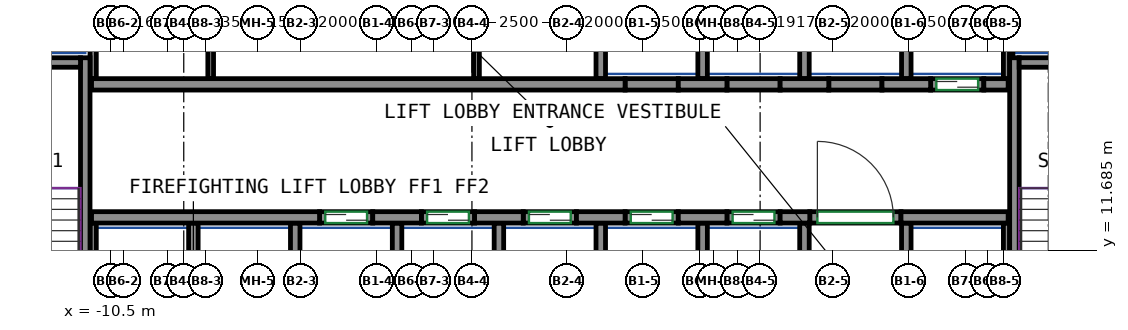
"""IFC4 building model, lengths in metres.
Left out: names, types, materials, properties, quantities, classifications, styles, units other than length and angle.
Written with IfcOpenShell. Run it as: python <this file> out.ifc"""

import sys

from ifc_helpers import new_model, si_unit, direction, frame, frame_2d, origin, place, context, subcontext, project, spatial, rectangle, extrude, source, transform, mapped, element, fill, save


model = new_model("IFC4")
c1 = context("Model", 3, precision=1e-05, world=origin(), true_north=direction((0.0, 1.0)))
c2 = subcontext(c1, "Body", "Model", "MODEL_VIEW")
j1 = project(units=[si_unit("LENGTHUNIT", "METRE"), si_unit("PLANEANGLEUNIT", "RADIAN")], contexts=[c1])
p1 = place(None, origin())
s1 = spatial("IfcSite", under=j1, at=p1, CompositionType="ELEMENT")
p2 = place(p1, origin())
s2 = spatial("IfcBuilding", under=s1, at=p2, CompositionType="ELEMENT")
p3 = place(p2, frame((0.0, 0.0, 154.1)))
s3 = spatial("IfcBuildingStorey", under=s2, at=p3, CompositionType="ELEMENT", Elevation=154.1)
m1 = source(origin(), c2, "Body", "SweptSolid", [
    extrude(rectangle(XDim=7.75, YDim=0.25, at=frame_2d((3.875, 0.0))), origin(), (0.0, 0.0, 1.0), 3.12),
])
p4 = place(p3, frame((-11.175, 9.0, 0.0), z_axis=(0.0, 0.0, 1.0), x_axis=(0.0, 1.0, 0.0)))
e1 = element("IfcWall", 1, at=p4, inside=s3, PredefinedType="SHEAR", context=c2, shape_type="MappedRepresentation", body=[
    mapped(m1, transform((0.0, 0.0, 0.0))),
])
m2 = source(origin(), c2, "Body", "SweptSolid", [
    extrude(rectangle(XDim=3.7, YDim=0.25, at=frame_2d((1.85, 0.0))), origin(), (0.0, 0.0, 1.0), 3.12),
])
p5 = place(p3, frame((-15.0, 16.625, 0.0), z_axis=(0.0, 0.0, 1.0), x_axis=(1.0, 0.0, 0.0)))
e2 = element("IfcWall", 2, at=p5, inside=s3, PredefinedType="SHEAR", context=c2, shape_type="MappedRepresentation", body=[
    mapped(m2, transform((0.0, 0.0, 0.0))),
])
p6 = place(p3, frame((13.275, 9.0, 0.0), z_axis=(0.0, 0.0, 1.0), x_axis=(0.0, 1.0, 0.0)))
e3 = element("IfcWall", 3, at=p6, inside=s3, PredefinedType="SHEAR", context=c2, shape_type="MappedRepresentation", body=[
    mapped(m1, transform((0.0, 0.0, 0.0))),
])
m3 = source(origin(), c2, "Body", "SweptSolid", [
    extrude(rectangle(XDim=3.7, YDim=0.25, at=frame_2d((1.85, 0.0))), origin(), (0.0, 0.0, 1.0), 3.12),
])
p7 = place(p3, frame((13.4, 16.625, 0.0), z_axis=(0.0, 0.0, 1.0), x_axis=(1.0, 0.0, 0.0)))
e4 = element("IfcWall", 4, at=p7, inside=s3, PredefinedType="SHEAR", context=c2, shape_type="MappedRepresentation", body=[
    mapped(m3, transform((0.0, 0.0, 0.0))),
])
m4 = source(origin(), c2, "Body", "SweptSolid", [
    extrude(rectangle(XDim=6.0, YDim=0.3, at=frame_2d((3.0, 0.0))), origin(), (0.0, 0.0, 1.0), 3.12),
])
p8 = place(p3, frame((-11.01, 12.55, 0.0), z_axis=(0.0, 0.0, 1.0), x_axis=(1.0, 0.0, 0.0)))
e5 = element("IfcWall", 5, at=p8, inside=s3, PredefinedType="SHEAR", context=c2, shape_type="MappedRepresentation", body=[
    mapped(m4, transform((0.0, 0.0, 0.0))),
])
m5 = source(origin(), c2, "Body", "SweptSolid", [
    extrude(rectangle(XDim=1.28, YDim=0.3, at=frame_2d((0.64, 0.0))), origin(), (0.0, 0.0, 1.0), 3.12),
])
for number, where, z_axis, x_axis in (
    (6, (-3.61, 12.55, 0.0), (0.0, 0.0, 1.0), (1.0, 0.0, 0.0)),
    (7, (-0.93, 12.55, 0.0), (0.0, 0.0, 1.0), (1.0, 0.0, 0.0)),
    (8, (1.75, 12.55, 0.0), (0.0, 0.0, 1.0), (1.0, 0.0, 0.0)),
    (9, (4.43, 12.55, 0.0), (0.0, 0.0, 1.0), (1.0, 0.0, 0.0)),
):
    element("IfcWall", number, at=place(p3, frame(where, z_axis=z_axis, x_axis=x_axis)), inside=s3, PredefinedType="SHEAR", context=c2, shape_type="MappedRepresentation", body=[
        mapped(m5, transform((0.0, 0.0, 0.0))),
    ])
m6 = source(origin(), c2, "Body", "SweptSolid", [
    extrude(rectangle(XDim=0.78, YDim=0.3, at=frame_2d((0.39, 0.0))), origin(), (0.0, 0.0, 1.0), 3.12),
])
p9 = place(p3, frame((7.11, 12.55, 0.0), z_axis=(0.0, 0.0, 1.0), x_axis=(1.0, 0.0, 0.0)))
e10 = element("IfcWall", 10, at=p9, inside=s3, PredefinedType="SHEAR", context=c2, shape_type="MappedRepresentation", body=[
    mapped(m6, transform((0.0, 0.0, 0.0))),
])
m7 = source(origin(), c2, "Body", "SweptSolid", [
    extrude(rectangle(XDim=2.82, YDim=0.3, at=frame_2d((1.41, 0.0))), origin(), (0.0, 0.0, 1.0), 3.12),
])
p10 = place(p3, frame((10.29, 12.55, 0.0), z_axis=(0.0, 0.0, 1.0), x_axis=(1.0, 0.0, 0.0)))
e11 = element("IfcWall", 11, at=p10, inside=s3, PredefinedType="SHEAR", context=c2, shape_type="MappedRepresentation", body=[
    mapped(m7, transform((0.0, 0.0, 0.0))),
])
m8 = source(origin(), c2, "Body", "SweptSolid", [
    extrude(rectangle(XDim=14.04, YDim=0.3, at=frame_2d((7.02, 0.0))), origin(), (0.0, 0.0, 1.0), 3.12),
])
p11 = place(p3, frame((-11.01, 16.05, 0.0), z_axis=(0.0, 0.0, 1.0), x_axis=(1.0, 0.0, 0.0)))
e12 = element("IfcWall", 12, at=p11, inside=s3, PredefinedType="SHEAR", context=c2, shape_type="MappedRepresentation", body=[
    mapped(m8, transform((0.0, 0.0, 0.0))),
])
p12 = place(p3, frame((4.43, 16.05, 0.0), z_axis=(0.0, 0.0, 1.0), x_axis=(1.0, 0.0, 0.0)))
e13 = element("IfcWall", 13, at=p12, inside=s3, PredefinedType="SHEAR", context=c2, shape_type="MappedRepresentation", body=[
    mapped(m5, transform((0.0, 0.0, 0.0))),
])
m9 = source(origin(), c2, "Body", "SweptSolid", [
    extrude(rectangle(XDim=1.28, YDim=0.3, at=frame_2d((0.64, 0.0))), origin(), (0.0, 0.0, 1.0), 3.12),
])
p13 = place(p3, frame((7.11, 16.05, 0.0), z_axis=(0.0, 0.0, 1.0), x_axis=(1.0, 0.0, 0.0)))
e14 = element("IfcWall", 14, at=p13, inside=s3, PredefinedType="SHEAR", context=c2, shape_type="MappedRepresentation", body=[
    mapped(m9, transform((0.0, 0.0, 0.0))),
])
p14 = place(p3, frame((9.79, 16.05, 0.0), z_axis=(0.0, 0.0, 1.0), x_axis=(1.0, 0.0, 0.0)))
e15 = element("IfcWall", 15, at=p14, inside=s3, PredefinedType="SHEAR", context=c2, shape_type="MappedRepresentation", body=[
    mapped(m5, transform((0.0, 0.0, 0.0))),
])
m10 = source(origin(), c2, "Body", "SweptSolid", [
    extrude(rectangle(XDim=0.64, YDim=0.3, at=frame_2d((0.32, 0.0))), origin(), (0.0, 0.0, 1.0), 3.12),
])
p15 = place(p3, frame((12.47, 16.05, 0.0), z_axis=(0.0, 0.0, 1.0), x_axis=(1.0, 0.0, 0.0)))
e16 = element("IfcWall", 16, at=p15, inside=s3, PredefinedType="SHEAR", context=c2, shape_type="MappedRepresentation", body=[
    mapped(m10, transform((0.0, 0.0, 0.0))),
])
m11 = source(origin(), c2, "Body", "SweptSolid", [
    extrude(rectangle(XDim=1.4, YDim=0.3, at=frame_2d((0.7, 0.0))), origin(), (0.0, 0.0, 1.0), 3.12),
])
p16 = place(p3, frame((-5.01, 12.55, 0.0), z_axis=(0.0, 0.0, 1.0), x_axis=(1.0, 0.0, 0.0)))
e17 = element("IfcWall", 17, at=p16, inside=s3, PredefinedType="PARTITIONING", context=c2, shape_type="MappedRepresentation", body=[
    mapped(m11, transform((0.0, 0.0, 0.0))),
])
p17 = place(p16, frame((0.15, 0.0, 0.0)))
e18 = element("IfcOpeningElement", 18, at=p17, cuts=e17, PredefinedType="OPENING", context=c2, shape_type="SweptSolid", body=[
    extrude(rectangle(XDim=1.1, YDim=2.1, at=frame_2d((0.55, 1.05))), frame((0.0, 0.16, 0.0), z_axis=(0.0, -1.0, 0.0), x_axis=(1.0, 0.0, 0.0)), (0.0, 0.0, 1.0), 0.32),
])
m12 = source(origin(), c2, "Body", "SweptSolid", [
    extrude(rectangle(XDim=1.4, YDim=0.3, at=frame_2d((0.7, 0.0))), origin(), (0.0, 0.0, 1.0), 3.12),
])
p18 = place(p3, frame((-2.33, 12.55, 0.0), z_axis=(0.0, 0.0, 1.0), x_axis=(1.0, 0.0, 0.0)))
e19 = element("IfcWall", 19, at=p18, inside=s3, PredefinedType="PARTITIONING", context=c2, shape_type="MappedRepresentation", body=[
    mapped(m12, transform((0.0, 0.0, 0.0))),
])
p19 = place(p18, frame((0.15, 0.0, 0.0)))
e20 = element("IfcOpeningElement", 20, at=p19, cuts=e19, PredefinedType="OPENING", context=c2, shape_type="SweptSolid", body=[
    extrude(rectangle(XDim=1.1, YDim=2.1, at=frame_2d((0.55, 1.05))), frame((0.0, 0.16, 0.0), z_axis=(0.0, -1.0, 0.0), x_axis=(1.0, 0.0, 0.0)), (0.0, 0.0, 1.0), 0.32),
])
p20 = place(p3, frame((0.35, 12.55, 0.0), z_axis=(0.0, 0.0, 1.0), x_axis=(1.0, 0.0, 0.0)))
e21 = element("IfcWall", 21, at=p20, inside=s3, PredefinedType="PARTITIONING", context=c2, shape_type="MappedRepresentation", body=[
    mapped(m11, transform((0.0, 0.0, 0.0))),
])
p21 = place(p20, frame((0.15, 0.0, 0.0)))
e22 = element("IfcOpeningElement", 22, at=p21, cuts=e21, PredefinedType="OPENING", context=c2, shape_type="SweptSolid", body=[
    extrude(rectangle(XDim=1.1, YDim=2.1, at=frame_2d((0.55, 1.05))), frame((0.0, 0.16, 0.0), z_axis=(0.0, -1.0, 0.0), x_axis=(1.0, 0.0, 0.0)), (0.0, 0.0, 1.0), 0.32),
])
p22 = place(p3, frame((3.03, 12.55, 0.0), z_axis=(0.0, 0.0, 1.0), x_axis=(1.0, 0.0, 0.0)))
e23 = element("IfcWall", 23, at=p22, inside=s3, PredefinedType="PARTITIONING", context=c2, shape_type="MappedRepresentation", body=[
    mapped(m11, transform((0.0, 0.0, 0.0))),
])
p23 = place(p22, frame((0.15, 0.0, 0.0)))
e24 = element("IfcOpeningElement", 24, at=p23, cuts=e23, PredefinedType="OPENING", context=c2, shape_type="SweptSolid", body=[
    extrude(rectangle(XDim=1.1, YDim=2.1, at=frame_2d((0.55, 1.05))), frame((0.0, 0.16, 0.0), z_axis=(0.0, -1.0, 0.0), x_axis=(1.0, 0.0, 0.0)), (0.0, 0.0, 1.0), 0.32),
])
p24 = place(p3, frame((5.71, 12.55, 0.0), z_axis=(0.0, 0.0, 1.0), x_axis=(1.0, 0.0, 0.0)))
e25 = element("IfcWall", 25, at=p24, inside=s3, PredefinedType="PARTITIONING", context=c2, shape_type="MappedRepresentation", body=[
    mapped(m12, transform((0.0, 0.0, 0.0))),
])
p25 = place(p24, frame((0.15, 0.0, 0.0)))
e26 = element("IfcOpeningElement", 26, at=p25, cuts=e25, PredefinedType="OPENING", context=c2, shape_type="SweptSolid", body=[
    extrude(rectangle(XDim=1.1, YDim=2.1, at=frame_2d((0.55, 1.05))), frame((0.0, 0.16, 0.0), z_axis=(0.0, -1.0, 0.0), x_axis=(1.0, 0.0, 0.0)), (0.0, 0.0, 1.0), 0.32),
])
p26 = place(p3, frame((11.07, 16.05, 0.0), z_axis=(0.0, 0.0, 1.0), x_axis=(1.0, 0.0, 0.0)))
e27 = element("IfcWall", 27, at=p26, inside=s3, PredefinedType="PARTITIONING", context=c2, shape_type="MappedRepresentation", body=[
    mapped(m11, transform((0.0, 0.0, 0.0))),
])
p27 = place(p26, frame((0.15, 0.0, 0.0)))
e28 = element("IfcOpeningElement", 28, at=p27, cuts=e27, PredefinedType="OPENING", context=c2, shape_type="SweptSolid", body=[
    extrude(rectangle(XDim=1.1, YDim=2.1, at=frame_2d((0.55, 1.05))), frame((0.0, 0.16, 0.0), z_axis=(0.0, -1.0, 0.0), x_axis=(1.0, 0.0, 0.0)), (0.0, 0.0, 1.0), 0.32),
])
m13 = source(origin(), c2, "Body", "SweptSolid", [
    extrude(rectangle(XDim=2.4, YDim=0.3, at=frame_2d((1.2, 0.0))), origin(), (0.0, 0.0, 1.0), 3.12),
])
p28 = place(p3, frame((7.89, 12.55, 0.0), z_axis=(0.0, 0.0, 1.0), x_axis=(1.0, 0.0, 0.0)))
e29 = element("IfcWall", 29, at=p28, inside=s3, PredefinedType="PARTITIONING", context=c2, shape_type="MappedRepresentation", body=[
    mapped(m13, transform((0.0, 0.0, 0.0))),
])
p29 = place(p28, frame((0.2, 0.0, 0.0)))
e30 = element("IfcOpeningElement", 30, at=p29, cuts=e29, PredefinedType="OPENING", context=c2, shape_type="SweptSolid", body=[
    extrude(rectangle(XDim=2.0, YDim=2.1, at=frame_2d((1.0, 1.05))), frame((0.0, 0.16, 0.0), z_axis=(0.0, -1.0, 0.0), x_axis=(1.0, 0.0, 0.0)), (0.0, 0.0, 1.0), 0.32),
])
p30 = place(p3, frame((3.03, 16.05, 0.0), z_axis=(0.0, 0.0, 1.0), x_axis=(1.0, 0.0, 0.0)))
e31 = element("IfcWall", 31, at=p30, inside=s3, PredefinedType="PARTITIONING", context=c2, shape_type="MappedRepresentation", body=[
    mapped(m11, transform((0.0, 0.0, 0.0))),
])
for number, where, z_axis, x_axis in (
    (32, (5.71, 16.05, 0.0), (0.0, 0.0, 1.0), (1.0, 0.0, 0.0)),
    (33, (8.39, 16.05, 0.0), (0.0, 0.0, 1.0), (1.0, 0.0, 0.0)),
):
    element("IfcWall", number, at=place(p3, frame(where, z_axis=z_axis, x_axis=x_axis)), inside=s3, PredefinedType="PARTITIONING", context=c2, shape_type="MappedRepresentation", body=[
        mapped(m12, transform((0.0, 0.0, 0.0))),
    ])
m14 = source(origin(), c2, "Body", "SweptSolid", [
    extrude(rectangle(XDim=3.275, YDim=0.165, at=frame_2d((1.638, 0.0))), origin(), (0.0, 0.0, 1.0), 3.12),
])
p31 = place(p3, frame((13.067, 16.2, 0.0), z_axis=(0.0, 0.0, 1.0), x_axis=(0.0, 1.0, 0.0)))
e34 = element("IfcWall", 34, at=p31, inside=s3, PredefinedType="PARTITIONING", context=c2, shape_type="MappedRepresentation", body=[
    mapped(m14, transform((0.0, 0.0, 0.0))),
])
m15 = source(origin(), c2, "Body", "SweptSolid", [
    extrude(rectangle(XDim=4.8, YDim=0.165, at=frame_2d((2.4, 0.0))), origin(), (0.0, 0.0, 1.0), 3.12),
])
p32 = place(p3, frame((-10.968, 16.2, 0.0), z_axis=(0.0, 0.0, 1.0), x_axis=(0.0, 1.0, 0.0)))
e35 = element("IfcWall", 35, at=p32, inside=s3, PredefinedType="PARTITIONING", context=c2, shape_type="MappedRepresentation", body=[
    mapped(m15, transform((0.0, 0.0, 0.0))),
])
m16 = source(origin(), c2, "Body", "SweptSolid", [
    extrude(rectangle(XDim=3.275, YDim=0.25, at=frame_2d((1.638, 0.0))), origin(), (0.0, 0.0, 1.0), 3.12),
])
p33 = place(p3, frame((10.43, 16.2, 0.0), z_axis=(0.0, 0.0, 1.0), x_axis=(0.0, 1.0, 0.0)))
e36 = element("IfcWall", 36, at=p33, inside=s3, PredefinedType="PARTITIONING", context=c2, shape_type="MappedRepresentation", body=[
    mapped(m16, transform((0.0, 0.0, 0.0))),
])
m17 = source(origin(), c2, "Body", "SweptSolid", [
    extrude(rectangle(XDim=2.725, YDim=0.085, at=frame_2d((1.363, 0.0))), origin(), (0.0, 0.0, 1.0), 3.12),
])
p34 = place(p3, frame((13.192, 16.75, 0.0), z_axis=(0.0, 0.0, 1.0), x_axis=(0.0, 1.0, 0.0)))
e37 = element("IfcWall", 37, at=p34, inside=s3, PredefinedType="PARTITIONING", context=c2, shape_type="MappedRepresentation", body=[
    mapped(m17, transform((0.0, 0.0, 0.0))),
])
for number, where, z_axis, x_axis in (
    (38, (2.39, 16.2, 0.0), (0.0, 0.0, 1.0), (0.0, 1.0, 0.0)),
    (39, (5.07, 16.2, 0.0), (0.0, 0.0, 1.0), (0.0, 1.0, 0.0)),
    (40, (7.75, 16.2, 0.0), (0.0, 0.0, 1.0), (0.0, 1.0, 0.0)),
):
    element("IfcWall", number, at=place(p3, frame(where, z_axis=z_axis, x_axis=x_axis)), inside=s3, PredefinedType="PARTITIONING", context=c2, shape_type="MappedRepresentation", body=[
        mapped(m16, transform((0.0, 0.0, 0.0))),
    ])
m18 = source(origin(), c2, "Body", "SweptSolid", [
    extrude(rectangle(XDim=3.4, YDim=0.25, at=frame_2d((1.7, 0.0))), origin(), (0.0, 0.0, 1.0), 3.12),
])
p35 = place(p3, frame((10.43, 9.0, 0.0), z_axis=(0.0, 0.0, 1.0), x_axis=(0.0, 1.0, 0.0)))
e41 = element("IfcWall", 41, at=p35, inside=s3, PredefinedType="PARTITIONING", context=c2, shape_type="MappedRepresentation", body=[
    mapped(m18, transform((0.0, 0.0, 0.0))),
])
m19 = source(origin(), c2, "Body", "SweptSolid", [
    extrude(rectangle(XDim=3.4, YDim=0.165, at=frame_2d((1.7, 0.0))), origin(), (0.0, 0.0, 1.0), 3.12),
])
p36 = place(p3, frame((13.067, 9.0, 0.0), z_axis=(0.0, 0.0, 1.0), x_axis=(0.0, 1.0, 0.0)))
e42 = element("IfcWall", 42, at=p36, inside=s3, PredefinedType="PARTITIONING", context=c2, shape_type="MappedRepresentation", body=[
    mapped(m19, transform((0.0, 0.0, 0.0))),
])
for number, where, z_axis, x_axis in (
    (43, (2.39, 9.0, 0.0), (0.0, 0.0, 1.0), (0.0, 1.0, 0.0)),
    (44, (5.07, 9.0, 0.0), (0.0, 0.0, 1.0), (0.0, 1.0, 0.0)),
    (45, (7.75, 9.0, 0.0), (0.0, 0.0, 1.0), (0.0, 1.0, 0.0)),
    (46, (-0.29, 9.0, 0.0), (0.0, 0.0, 1.0), (0.0, 1.0, 0.0)),
):
    element("IfcWall", number, at=place(p3, frame(where, z_axis=z_axis, x_axis=x_axis)), inside=s3, PredefinedType="PARTITIONING", context=c2, shape_type="MappedRepresentation", body=[
        mapped(m18, transform((0.0, 0.0, 0.0))),
    ])
p37 = place(p3, frame((-10.968, 9.0, 0.0), z_axis=(0.0, 0.0, 1.0), x_axis=(0.0, 1.0, 0.0)))
e47 = element("IfcWall", 47, at=p37, inside=s3, PredefinedType="PARTITIONING", context=c2, shape_type="MappedRepresentation", body=[
    mapped(m19, transform((0.0, 0.0, 0.0))),
])
for number, where, z_axis, x_axis in (
    (48, (-2.97, 9.0, 0.0), (0.0, 0.0, 1.0), (0.0, 1.0, 0.0)),
    (49, (-5.65, 9.0, 0.0), (0.0, 0.0, 1.0), (0.0, 1.0, 0.0)),
    (50, (-8.33, 9.0, 0.0), (0.0, 0.0, 1.0), (0.0, 1.0, 0.0)),
):
    element("IfcWall", number, at=place(p3, frame(where, z_axis=z_axis, x_axis=x_axis)), inside=s3, PredefinedType="PARTITIONING", context=c2, shape_type="MappedRepresentation", body=[
        mapped(m18, transform((0.0, 0.0, 0.0))),
    ])
m20 = source(origin(), c2, "Body", "SweptSolid", [
    extrude(rectangle(XDim=4.8, YDim=0.15, at=frame_2d((2.4, 0.0))), origin(), (0.0, 0.0, 1.0), 3.12),
])
for number, where, z_axis, x_axis in (
    (51, (-7.875, 16.2, 0.0), (0.0, 0.0, 1.0), (0.0, 1.0, 0.0)),
    (52, (-0.88, 16.2, 0.0), (0.0, 0.0, 1.0), (0.0, 1.0, 0.0)),
):
    element("IfcWall", number, at=place(p3, frame(where, z_axis=z_axis, x_axis=x_axis)), inside=s3, PredefinedType="PARTITIONING", context=c2, shape_type="MappedRepresentation", body=[
        mapped(m20, transform((0.0, 0.0, 0.0))),
    ])
p38 = place(p29, origin())
e53 = element("IfcDoor", 53, at=p38, inside=s3, OperationType="DOUBLE_DOOR_SINGLE_SWING", PredefinedType="DOOR", context=c2, shape_type="SweptSolid", body=[
    extrude(rectangle(XDim=2.0, YDim=2.1, at=frame_2d((1.0, 1.05))), frame((0.0, 0.025, 0.0), z_axis=(0.0, -1.0, 0.0), x_axis=(1.0, 0.0, 0.0)), (0.0, 0.0, 1.0), 0.05),
])
fill(e30, e53)
p39 = place(p17, origin())
e54 = element("IfcDoor", 54, at=p39, inside=s3, OperationType="DOUBLE_DOOR_SLIDING", PredefinedType="DOOR", context=c2, shape_type="SweptSolid", body=[
    extrude(rectangle(XDim=1.1, YDim=2.1, at=frame_2d((0.55, 1.05))), frame((0.0, 0.025, 0.0), z_axis=(0.0, -1.0, 0.0), x_axis=(1.0, 0.0, 0.0)), (0.0, 0.0, 1.0), 0.05),
])
fill(e18, e54)
p40 = place(p19, origin())
e55 = element("IfcDoor", 55, at=p40, inside=s3, OperationType="DOUBLE_DOOR_SLIDING", PredefinedType="DOOR", context=c2, shape_type="SweptSolid", body=[
    extrude(rectangle(XDim=1.1, YDim=2.1, at=frame_2d((0.55, 1.05))), frame((0.0, 0.025, 0.0), z_axis=(0.0, -1.0, 0.0), x_axis=(1.0, 0.0, 0.0)), (0.0, 0.0, 1.0), 0.05),
])
fill(e20, e55)
p41 = place(p21, origin())
e56 = element("IfcDoor", 56, at=p41, inside=s3, OperationType="DOUBLE_DOOR_SLIDING", PredefinedType="DOOR", context=c2, shape_type="SweptSolid", body=[
    extrude(rectangle(XDim=1.1, YDim=2.1, at=frame_2d((0.55, 1.05))), frame((0.0, 0.025, 0.0), z_axis=(0.0, -1.0, 0.0), x_axis=(1.0, 0.0, 0.0)), (0.0, 0.0, 1.0), 0.05),
])
fill(e22, e56)
p42 = place(p23, origin())
e57 = element("IfcDoor", 57, at=p42, inside=s3, OperationType="DOUBLE_DOOR_SLIDING", PredefinedType="DOOR", context=c2, shape_type="SweptSolid", body=[
    extrude(rectangle(XDim=1.1, YDim=2.1, at=frame_2d((0.55, 1.05))), frame((0.0, 0.025, 0.0), z_axis=(0.0, -1.0, 0.0), x_axis=(1.0, 0.0, 0.0)), (0.0, 0.0, 1.0), 0.05),
])
fill(e24, e57)
p43 = place(p25, origin())
e58 = element("IfcDoor", 58, at=p43, inside=s3, OperationType="DOUBLE_DOOR_SLIDING", PredefinedType="DOOR", context=c2, shape_type="SweptSolid", body=[
    extrude(rectangle(XDim=1.1, YDim=2.1, at=frame_2d((0.55, 1.05))), frame((0.0, 0.025, 0.0), z_axis=(0.0, -1.0, 0.0), x_axis=(1.0, 0.0, 0.0)), (0.0, 0.0, 1.0), 0.05),
])
fill(e26, e58)
p44 = place(p27, origin())
e59 = element("IfcDoor", 59, at=p44, inside=s3, OperationType="DOUBLE_DOOR_SLIDING", PredefinedType="DOOR", context=c2, shape_type="SweptSolid", body=[
    extrude(rectangle(XDim=1.1, YDim=2.1, at=frame_2d((0.55, 1.05))), frame((0.0, 0.025, 0.0), z_axis=(0.0, -1.0, 0.0), x_axis=(1.0, 0.0, 0.0)), (0.0, 0.0, 1.0), 0.05),
])
fill(e28, e59)
save(model, sys.argv[1])
